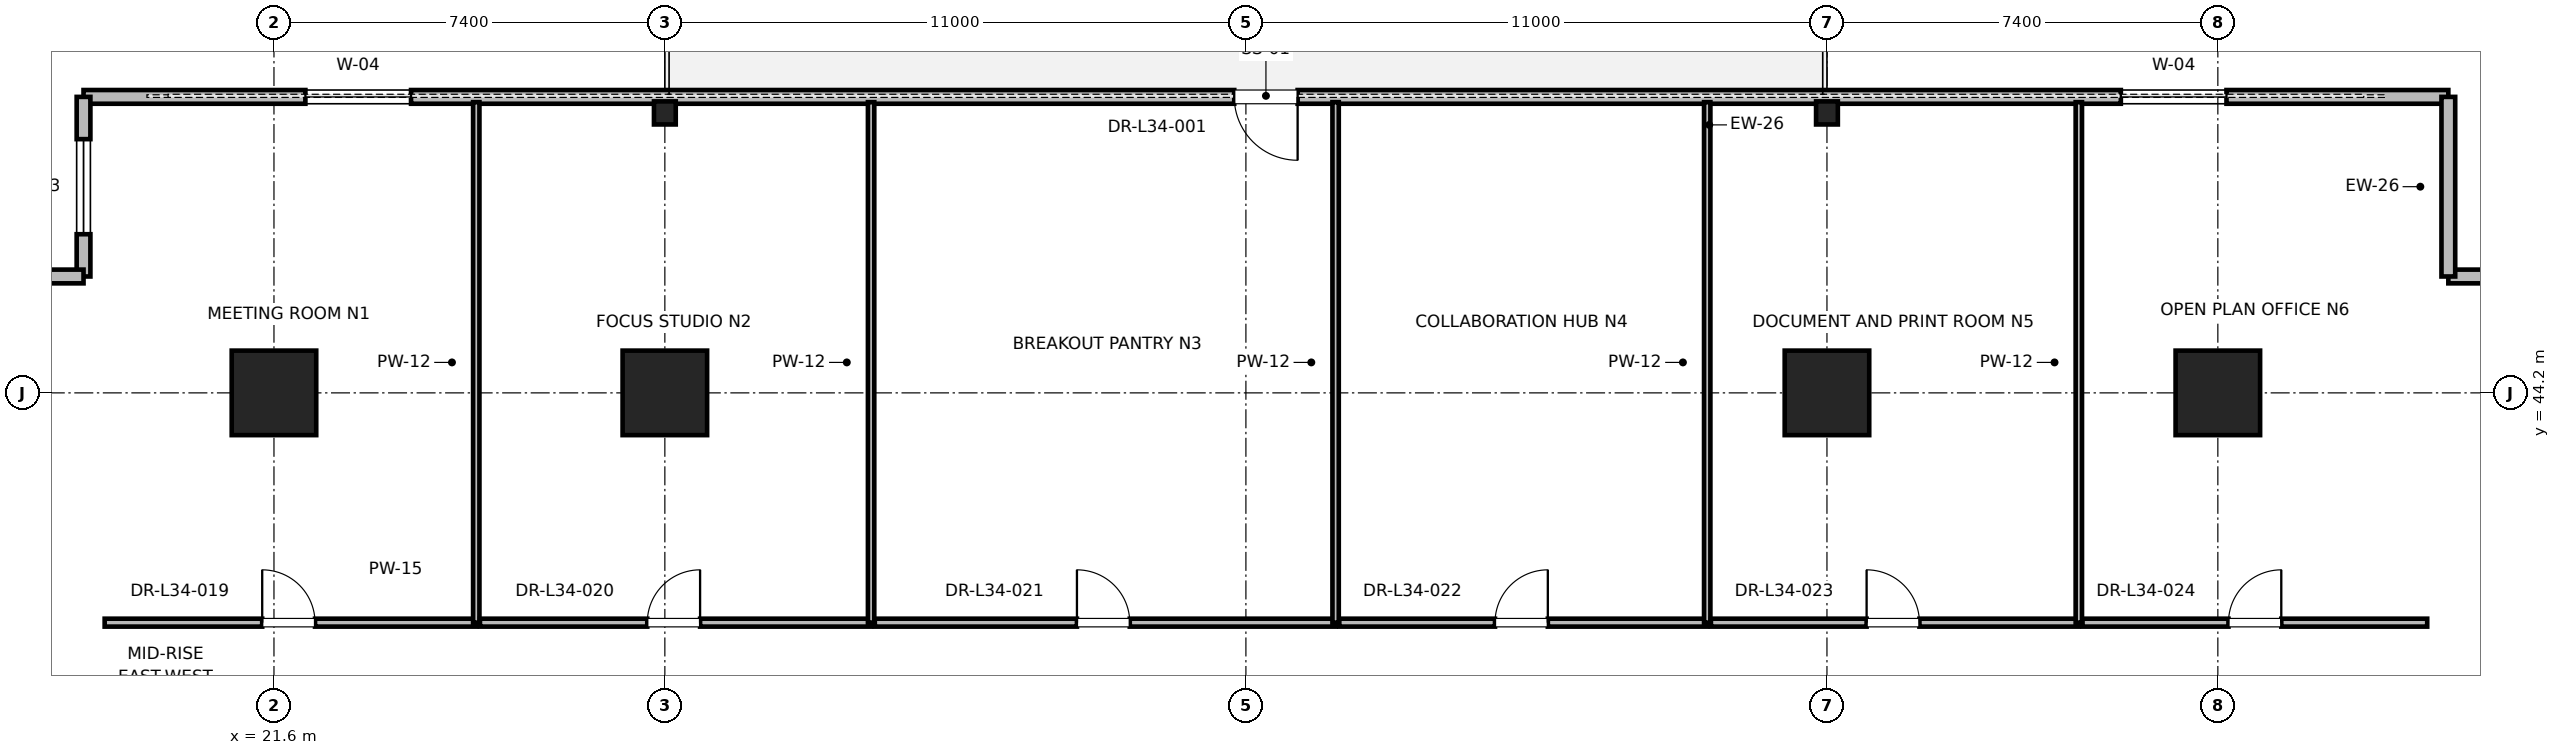
"""IFC4 building model, lengths in metres.
Left out: names, types, materials, properties, quantities, classifications, styles, units other than length and angle.
Written with IfcOpenShell. Run it as: python <this file> out.ifc"""

import sys

from ifc_helpers import new_model, si_unit, direction, frame, frame_2d, origin, origin_2d, place, context, subcontext, project, spatial, rectangle, i_section, extrude, element, fill, save


model = new_model("IFC4")
c1 = context("Model", 3, precision=1e-05, world=origin(), true_north=direction((0.0, 1.0)))
c2 = subcontext(c1, "Body", "Model", "MODEL_VIEW")
j1 = project(units=[si_unit("LENGTHUNIT", "METRE"), si_unit("PLANEANGLEUNIT", "RADIAN")], contexts=[c1])
p1 = place(None, origin())
s1 = spatial("IfcSite", under=j1, at=p1, CompositionType="ELEMENT")
p2 = place(p1, origin())
s2 = spatial("IfcBuilding", under=s1, at=p2, CompositionType="ELEMENT")
p3 = place(p2, frame((0.0, 0.0, 148.4)))
s3 = spatial("IfcBuildingStorey", under=s2, at=p3, CompositionType="ELEMENT", Elevation=148.4)
for number, where, z_axis, x_axis in (
    (1, (29.0, 44.2, 0.0), (0.0, 0.0, 1.0), (1.0, 0.0, 0.0)),
    (2, (51.0, 44.2, 0.0), (0.0, 0.0, 1.0), (1.0, 0.0, 0.0)),
    (3, (21.6, 44.2, 0.0), (0.0, 0.0, 1.0), (1.0, 0.0, 0.0)),
    (4, (58.4, 44.2, 0.0), (0.0, 0.0, 1.0), (1.0, 0.0, 0.0)),
):
    element("IfcColumn", number, at=place(p3, frame(where, z_axis=z_axis, x_axis=x_axis)), inside=s3, PredefinedType="COLUMN", context=c2, shape_type="SweptSolid", body=[
        extrude(rectangle(XDim=1.6, YDim=1.6, at=origin_2d()), origin(), (0.0, 0.0, 1.0), 4.0),
    ])
for number, where, z_axis, x_axis in (
    (5, (29.0, 49.5, 0.0), (0.0, 0.0, 1.0), (1.0, 0.0, 0.0)),
    (6, (51.0, 49.5, 0.0), (0.0, 0.0, 1.0), (1.0, 0.0, 0.0)),
):
    element("IfcColumn", number, at=place(p3, frame(where, z_axis=z_axis, x_axis=x_axis)), inside=s3, PredefinedType="COLUMN", context=c2, shape_type="SweptSolid", body=[
        extrude(i_section(OverallWidth=0.412, OverallDepth=0.437, WebThickness=0.036, FlangeThickness=0.058, FilletRadius=0.015, at=origin_2d()), origin(), (0.0, 0.0, 1.0), 4.0),
    ])
p4 = place(p3, frame((62.763, 49.804, 0.0), z_axis=(0.0, 0.0, 1.0), x_axis=(-1.0, 0.0, 0.0)))
e7 = element("IfcWall", 7, at=p4, inside=s3, PredefinedType="PARAPET", context=c2, shape_type="SweptSolid", body=[
    extrude(rectangle(XDim=44.769, YDim=0.26, at=frame_2d((22.384, 0.0))), origin(), (0.0, 0.0, 1.0), 2.97),
])
p5 = place(p4, frame((4.2, 0.0, 0.85)))
e8 = element("IfcOpeningElement", 8, at=p5, cuts=e7, PredefinedType="OPENING", context=c2, shape_type="SweptSolid", body=[
    extrude(rectangle(XDim=2.0, YDim=2.3, at=frame_2d((1.0, 1.15))), frame((0.0, 0.13, 0.0), z_axis=(0.0, -1.0, 0.0), x_axis=(1.0, 0.0, 0.0)), (0.0, 0.0, 1.0), 0.26),
])
p6 = place(p4, frame((21.784, 0.0, 0.0)))
e9 = element("IfcOpeningElement", 9, at=p6, cuts=e7, PredefinedType="OPENING", context=c2, shape_type="SweptSolid", body=[
    extrude(rectangle(XDim=1.2, YDim=2.2, at=frame_2d((0.6, 1.1))), frame((0.0, 0.13, 0.0), z_axis=(0.0, -1.0, 0.0), x_axis=(1.0, 0.0, 0.0)), (0.0, 0.0, 1.0), 0.26),
])
p7 = place(p4, frame((38.569, 0.0, 0.85)))
e10 = element("IfcOpeningElement", 10, at=p7, cuts=e7, PredefinedType="OPENING", context=c2, shape_type="SweptSolid", body=[
    extrude(rectangle(XDim=2.0, YDim=2.3, at=frame_2d((1.0, 1.15))), frame((0.0, 0.13, 0.0), z_axis=(0.0, -1.0, 0.0), x_axis=(1.0, 0.0, 0.0)), (0.0, 0.0, 1.0), 0.26),
])
p8 = place(p3, frame((66.563, 46.404, 0.0), z_axis=(0.0, 0.0, 1.0), x_axis=(-1.0, 0.0, 0.0)))
e11 = element("IfcWall", 11, at=p8, inside=s3, PredefinedType="PARAPET", context=c2, shape_type="SweptSolid", body=[
    extrude(rectangle(XDim=3.8, YDim=0.26, at=frame_2d((1.9, 0.0))), origin(), (0.0, 0.0, 1.0), 3.775),
])
p9 = place(p8, frame((1.0, 0.0, 0.85)))
e12 = element("IfcOpeningElement", 12, at=p9, cuts=e11, PredefinedType="OPENING", context=c2, shape_type="SweptSolid", body=[
    extrude(rectangle(XDim=1.8, YDim=2.2, at=frame_2d((0.9, 1.1))), frame((0.0, 0.13, 0.0), z_axis=(0.0, -1.0, 0.0), x_axis=(1.0, 0.0, 0.0)), (0.0, 0.0, 1.0), 0.26),
])
p10 = place(p3, frame((62.763, 46.404, 0.0), z_axis=(0.0, 0.0, 1.0), x_axis=(0.0, 1.0, 0.0)))
e13 = element("IfcWall", 13, at=p10, inside=s3, PredefinedType="PARAPET", context=c2, shape_type="SweptSolid", body=[
    extrude(rectangle(XDim=3.4, YDim=0.26, at=frame_2d((1.7, 0.0))), origin(), (0.0, 0.0, 1.0), 3.775),
])
p11 = place(p3, frame((17.995, 49.804, 0.0), z_axis=(0.0, 0.0, 1.0), x_axis=(0.0, -1.0, 0.0)))
e14 = element("IfcWall", 14, at=p11, inside=s3, PredefinedType="PARAPET", context=c2, shape_type="SweptSolid", body=[
    extrude(rectangle(XDim=3.4, YDim=0.26, at=frame_2d((1.7, 0.0))), origin(), (0.0, 0.0, 1.0), 3.775),
])
p12 = place(p11, frame((0.8, 0.0, 0.85)))
e15 = element("IfcOpeningElement", 15, at=p12, cuts=e14, PredefinedType="OPENING", context=c2, shape_type="SweptSolid", body=[
    extrude(rectangle(XDim=1.8, YDim=2.2, at=frame_2d((0.9, 1.1))), frame((0.0, 0.13, 0.0), z_axis=(0.0, -1.0, 0.0), x_axis=(1.0, 0.0, 0.0)), (0.0, 0.0, 1.0), 0.26),
])
p13 = place(p3, frame((17.995, 46.404, 0.0), z_axis=(0.0, 0.0, 1.0), x_axis=(-1.0, 0.0, 0.0)))
e16 = element("IfcWall", 16, at=p13, inside=s3, PredefinedType="PARAPET", context=c2, shape_type="SweptSolid", body=[
    extrude(rectangle(XDim=3.8, YDim=0.26, at=frame_2d((1.9, 0.0))), origin(), (0.0, 0.0, 1.0), 3.775),
])
p14 = place(p3, frame((18.395, 39.85, 0.0), z_axis=(0.0, 0.0, 1.0), x_axis=(1.0, 0.0, 0.0)))
e17 = element("IfcWall", 17, at=p14, inside=s3, PredefinedType="PARTITIONING", context=c2, shape_type="SweptSolid", body=[
    extrude(rectangle(XDim=7.035, YDim=0.15, at=frame_2d((3.518, 0.0))), origin(), (0.0, 0.0, 1.0), 2.85),
])
p15 = place(p14, frame((2.982, 0.0, 0.0)))
e18 = element("IfcOpeningElement", 18, at=p15, cuts=e17, PredefinedType="OPENING", context=c2, shape_type="SweptSolid", body=[
    extrude(rectangle(XDim=1.0, YDim=2.15, at=frame_2d((0.5, 1.075))), frame((0.0, 0.075, 0.0), z_axis=(0.0, -1.0, 0.0), x_axis=(1.0, 0.0, 0.0)), (0.0, 0.0, 1.0), 0.15),
])
p16 = place(p3, frame((25.43, 39.85, 0.0), z_axis=(0.0, 0.0, 1.0), x_axis=(0.0, 1.0, 0.0)))
e19 = element("IfcWall", 19, at=p16, inside=s3, PredefinedType="PARTITIONING", context=c2, shape_type="SweptSolid", body=[
    extrude(rectangle(XDim=9.854, YDim=0.12, at=frame_2d((4.927, 0.0))), origin(), (0.0, 0.0, 1.0), 2.85),
])
p17 = place(p3, frame((25.5, 39.85, 0.0), z_axis=(0.0, 0.0, 1.0), x_axis=(1.0, 0.0, 0.0)))
e20 = element("IfcWall", 20, at=p17, inside=s3, PredefinedType="PARTITIONING", context=c2, shape_type="SweptSolid", body=[
    extrude(rectangle(XDim=7.405, YDim=0.15, at=frame_2d((3.702, 0.0))), origin(), (0.0, 0.0, 1.0), 2.85),
])
p18 = place(p17, frame((3.167, 0.0, 0.0)))
e21 = element("IfcOpeningElement", 21, at=p18, cuts=e20, PredefinedType="OPENING", context=c2, shape_type="SweptSolid", body=[
    extrude(rectangle(XDim=1.0, YDim=2.15, at=frame_2d((0.5, 1.075))), frame((0.0, 0.075, 0.0), z_axis=(0.0, -1.0, 0.0), x_axis=(1.0, 0.0, 0.0)), (0.0, 0.0, 1.0), 0.15),
])
p19 = place(p3, frame((32.905, 39.85, 0.0), z_axis=(0.0, 0.0, 1.0), x_axis=(0.0, 1.0, 0.0)))
e22 = element("IfcWall", 22, at=p19, inside=s3, PredefinedType="PARTITIONING", context=c2, shape_type="SweptSolid", body=[
    extrude(rectangle(XDim=9.854, YDim=0.12, at=frame_2d((4.927, 0.0))), origin(), (0.0, 0.0, 1.0), 2.405),
])
p20 = place(p3, frame((32.975, 39.85, 0.0), z_axis=(0.0, 0.0, 1.0), x_axis=(1.0, 0.0, 0.0)))
e23 = element("IfcWall", 23, at=p20, inside=s3, PredefinedType="PARTITIONING", context=c2, shape_type="SweptSolid", body=[
    extrude(rectangle(XDim=8.724, YDim=0.15, at=frame_2d((4.362, 0.0))), origin(), (0.0, 0.0, 1.0), 2.85),
])
p21 = place(p20, frame((3.827, 0.0, 0.0)))
e24 = element("IfcOpeningElement", 24, at=p21, cuts=e23, PredefinedType="OPENING", context=c2, shape_type="SweptSolid", body=[
    extrude(rectangle(XDim=1.0, YDim=2.15, at=frame_2d((0.5, 1.075))), frame((0.0, 0.075, 0.0), z_axis=(0.0, -1.0, 0.0), x_axis=(1.0, 0.0, 0.0)), (0.0, 0.0, 1.0), 0.15),
])
p22 = place(p3, frame((41.698, 39.85, 0.0), z_axis=(0.0, 0.0, 1.0), x_axis=(0.0, 1.0, 0.0)))
e25 = element("IfcWall", 25, at=p22, inside=s3, PredefinedType="PARTITIONING", context=c2, shape_type="SweptSolid", body=[
    extrude(rectangle(XDim=9.854, YDim=0.12, at=frame_2d((4.927, 0.0))), origin(), (0.0, 0.0, 1.0), 2.405),
])
p23 = place(p3, frame((41.768, 39.85, 0.0), z_axis=(0.0, 0.0, 1.0), x_axis=(1.0, 0.0, 0.0)))
e26 = element("IfcWall", 26, at=p23, inside=s3, PredefinedType="PARTITIONING", context=c2, shape_type="SweptSolid", body=[
    extrude(rectangle(XDim=6.965, YDim=0.15, at=frame_2d((3.482, 0.0))), origin(), (0.0, 0.0, 1.0), 2.85),
])
p24 = place(p23, frame((2.948, 0.0, 0.0)))
e27 = element("IfcOpeningElement", 27, at=p24, cuts=e26, PredefinedType="OPENING", context=c2, shape_type="SweptSolid", body=[
    extrude(rectangle(XDim=1.0, YDim=2.15, at=frame_2d((0.5, 1.075))), frame((0.0, 0.075, 0.0), z_axis=(0.0, -1.0, 0.0), x_axis=(1.0, 0.0, 0.0)), (0.0, 0.0, 1.0), 0.15),
])
p25 = place(p3, frame((48.733, 39.85, 0.0), z_axis=(0.0, 0.0, 1.0), x_axis=(0.0, 1.0, 0.0)))
e28 = element("IfcWall", 28, at=p25, inside=s3, PredefinedType="PARTITIONING", context=c2, shape_type="SweptSolid", body=[
    extrude(rectangle(XDim=9.854, YDim=0.12, at=frame_2d((4.927, 0.0))), origin(), (0.0, 0.0, 1.0), 2.405),
])
p26 = place(p3, frame((48.803, 39.85, 0.0), z_axis=(0.0, 0.0, 1.0), x_axis=(1.0, 0.0, 0.0)))
e29 = element("IfcWall", 29, at=p26, inside=s3, PredefinedType="PARTITIONING", context=c2, shape_type="SweptSolid", body=[
    extrude(rectangle(XDim=6.965, YDim=0.15, at=frame_2d((3.482, 0.0))), origin(), (0.0, 0.0, 1.0), 2.85),
])
p27 = place(p26, frame((2.948, 0.0, 0.0)))
e30 = element("IfcOpeningElement", 30, at=p27, cuts=e29, PredefinedType="OPENING", context=c2, shape_type="SweptSolid", body=[
    extrude(rectangle(XDim=1.0, YDim=2.15, at=frame_2d((0.5, 1.075))), frame((0.0, 0.075, 0.0), z_axis=(0.0, -1.0, 0.0), x_axis=(1.0, 0.0, 0.0)), (0.0, 0.0, 1.0), 0.15),
])
p28 = place(p3, frame((55.768, 39.85, 0.0), z_axis=(0.0, 0.0, 1.0), x_axis=(0.0, 1.0, 0.0)))
e31 = element("IfcWall", 31, at=p28, inside=s3, PredefinedType="PARTITIONING", context=c2, shape_type="SweptSolid", body=[
    extrude(rectangle(XDim=9.854, YDim=0.12, at=frame_2d((4.927, 0.0))), origin(), (0.0, 0.0, 1.0), 2.85),
])
p29 = place(p3, frame((55.838, 39.85, 0.0), z_axis=(0.0, 0.0, 1.0), x_axis=(1.0, 0.0, 0.0)))
e32 = element("IfcWall", 32, at=p29, inside=s3, PredefinedType="PARTITIONING", context=c2, shape_type="SweptSolid", body=[
    extrude(rectangle(XDim=6.525, YDim=0.15, at=frame_2d((3.263, 0.0))), origin(), (0.0, 0.0, 1.0), 2.85),
])
p30 = place(p29, frame((2.763, 0.0, 0.0)))
e33 = element("IfcOpeningElement", 33, at=p30, cuts=e32, PredefinedType="OPENING", context=c2, shape_type="SweptSolid", body=[
    extrude(rectangle(XDim=1.0, YDim=2.15, at=frame_2d((0.5, 1.075))), frame((0.0, 0.075, 0.0), z_axis=(0.0, -1.0, 0.0), x_axis=(1.0, 0.0, 0.0)), (0.0, 0.0, 1.0), 0.15),
])
p31 = place(p5, origin())
e34 = element("IfcWindow", 34, at=p31, inside=s3, PartitioningType="SINGLE_PANEL", PredefinedType="WINDOW", context=c2, shape_type="SweptSolid", body=[
    extrude(rectangle(XDim=2.0, YDim=2.3, at=frame_2d((1.0, 1.15))), frame((0.0, 0.03, 0.0), z_axis=(0.0, -1.0, 0.0), x_axis=(1.0, 0.0, 0.0)), (0.0, 0.0, 1.0), 0.06),
])
fill(e8, e34)
p32 = place(p6, origin())
e35 = element("IfcDoor", 35, at=p32, inside=s3, OperationType="SINGLE_SWING_LEFT", PredefinedType="DOOR", context=c2, shape_type="SweptSolid", body=[
    extrude(rectangle(XDim=1.2, YDim=2.2, at=frame_2d((0.6, 1.1))), frame((0.0, 0.025, 0.0), z_axis=(0.0, -1.0, 0.0), x_axis=(1.0, 0.0, 0.0)), (0.0, 0.0, 1.0), 0.05),
])
fill(e9, e35)
p33 = place(p7, origin())
e36 = element("IfcWindow", 36, at=p33, inside=s3, PartitioningType="SINGLE_PANEL", PredefinedType="WINDOW", context=c2, shape_type="SweptSolid", body=[
    extrude(rectangle(XDim=2.0, YDim=2.3, at=frame_2d((1.0, 1.15))), frame((0.0, 0.03, 0.0), z_axis=(0.0, -1.0, 0.0), x_axis=(1.0, 0.0, 0.0)), (0.0, 0.0, 1.0), 0.06),
])
fill(e10, e36)
p34 = place(p12, origin())
e37 = element("IfcWindow", 37, at=p34, inside=s3, PartitioningType="SINGLE_PANEL", PredefinedType="WINDOW", context=c2, shape_type="SweptSolid", body=[
    extrude(rectangle(XDim=1.8, YDim=2.2, at=frame_2d((0.9, 1.1))), frame((0.0, 0.03, 0.0), z_axis=(0.0, -1.0, 0.0), x_axis=(1.0, 0.0, 0.0)), (0.0, 0.0, 1.0), 0.06),
])
fill(e15, e37)
p35 = place(p15, origin())
e38 = element("IfcDoor", 38, at=p35, inside=s3, OperationType="SINGLE_SWING_LEFT", PredefinedType="DOOR", context=c2, shape_type="SweptSolid", body=[
    extrude(rectangle(XDim=1.0, YDim=2.15, at=frame_2d((0.5, 1.075))), frame((0.0, 0.025, 0.0), z_axis=(0.0, -1.0, 0.0), x_axis=(1.0, 0.0, 0.0)), (0.0, 0.0, 1.0), 0.05),
])
fill(e18, e38)
p36 = place(p18, origin())
e39 = element("IfcDoor", 39, at=p36, inside=s3, OperationType="SINGLE_SWING_RIGHT", PredefinedType="DOOR", context=c2, shape_type="SweptSolid", body=[
    extrude(rectangle(XDim=1.0, YDim=2.15, at=frame_2d((0.5, 1.075))), frame((0.0, 0.025, 0.0), z_axis=(0.0, -1.0, 0.0), x_axis=(1.0, 0.0, 0.0)), (0.0, 0.0, 1.0), 0.05),
])
fill(e21, e39)
p37 = place(p21, origin())
e40 = element("IfcDoor", 40, at=p37, inside=s3, OperationType="SINGLE_SWING_LEFT", PredefinedType="DOOR", context=c2, shape_type="SweptSolid", body=[
    extrude(rectangle(XDim=1.0, YDim=2.15, at=frame_2d((0.5, 1.075))), frame((0.0, 0.025, 0.0), z_axis=(0.0, -1.0, 0.0), x_axis=(1.0, 0.0, 0.0)), (0.0, 0.0, 1.0), 0.05),
])
fill(e24, e40)
p38 = place(p24, origin())
e41 = element("IfcDoor", 41, at=p38, inside=s3, OperationType="SINGLE_SWING_RIGHT", PredefinedType="DOOR", context=c2, shape_type="SweptSolid", body=[
    extrude(rectangle(XDim=1.0, YDim=2.15, at=frame_2d((0.5, 1.075))), frame((0.0, 0.025, 0.0), z_axis=(0.0, -1.0, 0.0), x_axis=(1.0, 0.0, 0.0)), (0.0, 0.0, 1.0), 0.05),
])
fill(e27, e41)
p39 = place(p27, origin())
e42 = element("IfcDoor", 42, at=p39, inside=s3, OperationType="SINGLE_SWING_LEFT", PredefinedType="DOOR", context=c2, shape_type="SweptSolid", body=[
    extrude(rectangle(XDim=1.0, YDim=2.15, at=frame_2d((0.5, 1.075))), frame((0.0, 0.025, 0.0), z_axis=(0.0, -1.0, 0.0), x_axis=(1.0, 0.0, 0.0)), (0.0, 0.0, 1.0), 0.05),
])
fill(e30, e42)
p40 = place(p30, origin())
e43 = element("IfcDoor", 43, at=p40, inside=s3, OperationType="SINGLE_SWING_RIGHT", PredefinedType="DOOR", context=c2, shape_type="SweptSolid", body=[
    extrude(rectangle(XDim=1.0, YDim=2.15, at=frame_2d((0.5, 1.075))), frame((0.0, 0.025, 0.0), z_axis=(0.0, -1.0, 0.0), x_axis=(1.0, 0.0, 0.0)), (0.0, 0.0, 1.0), 0.05),
])
fill(e33, e43)
save(model, sys.argv[1])
